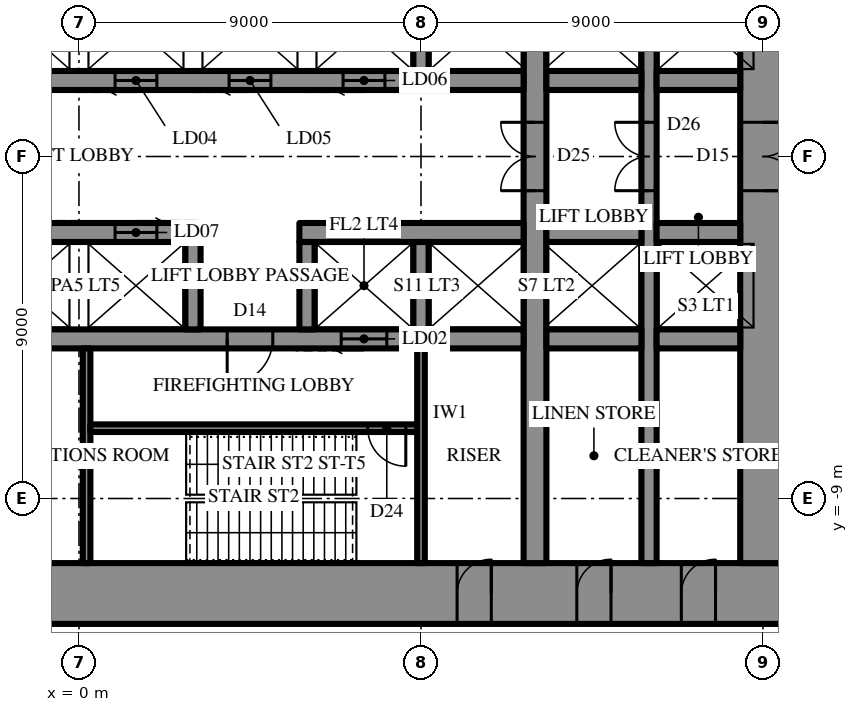
"""IFC4 building model, lengths in metres.
Left out: names, types, materials, properties, quantities, classifications, styles, units other than length and angle.
Written with IfcOpenShell. Run it as: python <this file> out.ifc"""

import sys

from ifc_helpers import new_model, si_unit, direction, frame, frame_2d, origin, place, context, subcontext, project, spatial, rectangle, extrude, element, fill, save


model = new_model("IFC4")
c1 = context("Model", 3, precision=1e-05, world=origin(), true_north=direction((0.0, 1.0)))
c2 = subcontext(c1, "Body", "Model", "MODEL_VIEW")
j1 = project(units=[si_unit("LENGTHUNIT", "METRE"), si_unit("PLANEANGLEUNIT", "RADIAN")], contexts=[c1])
p1 = place(None, origin())
s1 = spatial("IfcSite", under=j1, at=p1, CompositionType="ELEMENT")
p2 = place(p1, origin())
s2 = spatial("IfcBuilding", under=s1, at=p2, CompositionType="ELEMENT")
p3 = place(p2, frame((0.0, 0.0, 7.0)))
s3 = spatial("IfcBuildingStorey", under=s2, at=p3, CompositionType="ELEMENT", Elevation=7.0)
p4 = place(p3, frame((18.6, -11.5, 0.0), z_axis=(0.0, 0.0, 1.0), x_axis=(-1.0, 0.0, 0.0)))
e1 = element("IfcWall", 1, at=p4, inside=s3, PredefinedType="SHEAR", context=c2, shape_type="SweptSolid", body=[
    extrude(rectangle(XDim=37.2, YDim=1.6, at=frame_2d((18.6, 0.0))), origin(), (0.0, 0.0, 1.0), 6.0),
])
p5 = place(p4, frame((19.45, 0.0, 0.0)))
e2 = element("IfcOpeningElement", 2, at=p5, cuts=e1, PredefinedType="OPENING", context=c2, shape_type="SweptSolid", body=[
    extrude(rectangle(XDim=0.9, YDim=2.2, at=frame_2d((0.45, 1.1))), frame((0.0, 0.81, 0.0), z_axis=(0.0, -1.0, 0.0), x_axis=(1.0, 0.0, 0.0)), (0.0, 0.0, 1.0), 1.62),
])
p6 = place(p4, frame((22.45, 0.0, 0.0)))
e3 = element("IfcOpeningElement", 3, at=p6, cuts=e1, PredefinedType="OPENING", context=c2, shape_type="SweptSolid", body=[
    extrude(rectangle(XDim=0.9, YDim=2.2, at=frame_2d((0.45, 1.1))), frame((0.0, 0.81, 0.0), z_axis=(0.0, -1.0, 0.0), x_axis=(1.0, 0.0, 0.0)), (0.0, 0.0, 1.0), 1.62),
])
p7 = place(p4, frame((25.5, 0.0, 0.0)))
e4 = element("IfcOpeningElement", 4, at=p7, cuts=e1, PredefinedType="OPENING", context=c2, shape_type="SweptSolid", body=[
    extrude(rectangle(XDim=1.0, YDim=2.2, at=frame_2d((0.5, 1.1))), frame((0.0, 0.81, 0.0), z_axis=(0.0, -1.0, 0.0), x_axis=(1.0, 0.0, 0.0)), (0.0, 0.0, 1.0), 1.62),
])
p8 = place(p4, frame((1.85, 0.0, 0.0)))
e5 = element("IfcOpeningElement", 5, at=p8, cuts=e1, PredefinedType="OPENING", context=c2, shape_type="SweptSolid", body=[
    extrude(rectangle(XDim=0.9, YDim=2.2, at=frame_2d((0.45, 1.1))), frame((0.0, 0.81, 0.0), z_axis=(0.0, -1.0, 0.0), x_axis=(1.0, 0.0, 0.0)), (0.0, 0.0, 1.0), 1.62),
])
p9 = place(p4, frame((4.6, 0.0, 0.0)))
e6 = element("IfcOpeningElement", 6, at=p9, cuts=e1, PredefinedType="OPENING", context=c2, shape_type="SweptSolid", body=[
    extrude(rectangle(XDim=0.9, YDim=2.2, at=frame_2d((0.45, 1.1))), frame((0.0, 0.81, 0.0), z_axis=(0.0, -1.0, 0.0), x_axis=(1.0, 0.0, 0.0)), (0.0, 0.0, 1.0), 1.62),
])
p10 = place(p4, frame((7.75, 0.0, 0.0)))
e7 = element("IfcOpeningElement", 7, at=p10, cuts=e1, PredefinedType="OPENING", context=c2, shape_type="SweptSolid", body=[
    extrude(rectangle(XDim=0.9, YDim=2.2, at=frame_2d((0.45, 1.1))), frame((0.0, 0.81, 0.0), z_axis=(0.0, -1.0, 0.0), x_axis=(1.0, 0.0, 0.0)), (0.0, 0.0, 1.0), 1.62),
])
p11 = place(p4, frame((28.55, 0.0, 0.0)))
e8 = element("IfcOpeningElement", 8, at=p11, cuts=e1, PredefinedType="OPENING", context=c2, shape_type="SweptSolid", body=[
    extrude(rectangle(XDim=0.9, YDim=2.2, at=frame_2d((0.45, 1.1))), frame((0.0, 0.81, 0.0), z_axis=(0.0, -1.0, 0.0), x_axis=(1.0, 0.0, 0.0)), (0.0, 0.0, 1.0), 1.62),
])
p12 = place(p4, frame((31.7, 0.0, 0.0)))
e9 = element("IfcOpeningElement", 9, at=p12, cuts=e1, PredefinedType="OPENING", context=c2, shape_type="SweptSolid", body=[
    extrude(rectangle(XDim=0.9, YDim=2.2, at=frame_2d((0.45, 1.1))), frame((0.0, 0.81, 0.0), z_axis=(0.0, -1.0, 0.0), x_axis=(1.0, 0.0, 0.0)), (0.0, 0.0, 1.0), 1.62),
])
p13 = place(p4, frame((34.45, 0.0, 0.0)))
e10 = element("IfcOpeningElement", 10, at=p13, cuts=e1, PredefinedType="OPENING", context=c2, shape_type="SweptSolid", body=[
    extrude(rectangle(XDim=0.9, YDim=2.2, at=frame_2d((0.45, 1.1))), frame((0.0, 0.81, 0.0), z_axis=(0.0, -1.0, 0.0), x_axis=(1.0, 0.0, 0.0)), (0.0, 0.0, 1.0), 1.62),
])
p14 = place(p3, frame((18.0, -10.7, 0.0), z_axis=(0.0, 0.0, 1.0), x_axis=(0.0, 1.0, 0.0)))
e11 = element("IfcWall", 11, at=p14, inside=s3, PredefinedType="SHEAR", context=c2, shape_type="SweptSolid", body=[
    extrude(rectangle(XDim=21.4, YDim=1.2, at=frame_2d((10.7, 0.0))), origin(), (0.0, 0.0, 1.0), 6.0),
])
p15 = place(p14, frame((9.8, 0.0, 0.0)))
e12 = element("IfcOpeningElement", 12, at=p15, cuts=e11, PredefinedType="OPENING", context=c2, shape_type="SweptSolid", body=[
    extrude(rectangle(XDim=1.8, YDim=2.4, at=frame_2d((0.9, 1.2))), frame((0.0, 0.61, 0.0), z_axis=(0.0, -1.0, 0.0), x_axis=(1.0, 0.0, 0.0)), (0.0, 0.0, 1.0), 1.22),
])
p16 = place(p3, frame((12.0, -10.7, 0.0), z_axis=(0.0, 0.0, 1.0), x_axis=(0.0, 1.0, 0.0)))
e13 = element("IfcWall", 13, at=p16, inside=s3, PredefinedType="SHEAR", context=c2, shape_type="SweptSolid", body=[
    extrude(rectangle(XDim=21.4, YDim=0.6, at=frame_2d((10.7, 0.0))), origin(), (0.0, 0.0, 1.0), 6.0),
])
p17 = place(p16, frame((9.8, 0.0, 0.0)))
e14 = element("IfcOpeningElement", 14, at=p17, cuts=e13, PredefinedType="OPENING", context=c2, shape_type="SweptSolid", body=[
    extrude(rectangle(XDim=1.8, YDim=2.4, at=frame_2d((0.9, 1.2))), frame((0.0, 0.31, 0.0), z_axis=(0.0, -1.0, 0.0), x_axis=(1.0, 0.0, 0.0)), (0.0, 0.0, 1.0), 0.62),
])
p18 = place(p3, frame((15.0, -10.7, 0.0), z_axis=(0.0, 0.0, 1.0), x_axis=(0.0, 1.0, 0.0)))
e15 = element("IfcWall", 15, at=p18, inside=s3, PredefinedType="SHEAR", context=c2, shape_type="SweptSolid", body=[
    extrude(rectangle(XDim=21.4, YDim=0.4, at=frame_2d((10.7, 0.0))), origin(), (0.0, 0.0, 1.0), 6.0),
])
p19 = place(p18, frame((9.8, 0.0, 0.0)))
e16 = element("IfcOpeningElement", 16, at=p19, cuts=e15, PredefinedType="OPENING", context=c2, shape_type="SweptSolid", body=[
    extrude(rectangle(XDim=1.8, YDim=2.4, at=frame_2d((0.9, 1.2))), frame((0.0, 0.21, 0.0), z_axis=(0.0, -1.0, 0.0), x_axis=(1.0, 0.0, 0.0)), (0.0, 0.0, 1.0), 0.42),
])
p20 = place(p3, frame((-3.2, 2.0, 0.0), z_axis=(0.0, 0.0, 1.0), x_axis=(1.0, 0.0, 0.0)))
e17 = element("IfcWall", 17, at=p20, inside=s3, PredefinedType="SHEAR", context=c2, shape_type="SweptSolid", body=[
    extrude(rectangle(XDim=14.9, YDim=0.5, at=frame_2d((7.45, 0.0))), origin(), (0.0, 0.0, 1.0), 6.0),
])
p21 = place(p20, frame((1.15, 0.0, 0.0)))
e18 = element("IfcOpeningElement", 18, at=p21, cuts=e17, PredefinedType="OPENING", context=c2, shape_type="SweptSolid", body=[
    extrude(rectangle(XDim=1.1, YDim=2.2, at=frame_2d((0.55, 1.1))), frame((0.0, 0.26, 0.0), z_axis=(0.0, -1.0, 0.0), x_axis=(1.0, 0.0, 0.0)), (0.0, 0.0, 1.0), 0.52),
])
p22 = place(p20, frame((4.15, 0.0, 0.0)))
e19 = element("IfcOpeningElement", 19, at=p22, cuts=e17, PredefinedType="OPENING", context=c2, shape_type="SweptSolid", body=[
    extrude(rectangle(XDim=1.1, YDim=2.2, at=frame_2d((0.55, 1.1))), frame((0.0, 0.26, 0.0), z_axis=(0.0, -1.0, 0.0), x_axis=(1.0, 0.0, 0.0)), (0.0, 0.0, 1.0), 0.52),
])
p23 = place(p20, frame((7.15, 0.0, 0.0)))
e20 = element("IfcOpeningElement", 20, at=p23, cuts=e17, PredefinedType="OPENING", context=c2, shape_type="SweptSolid", body=[
    extrude(rectangle(XDim=1.1, YDim=2.2, at=frame_2d((0.55, 1.1))), frame((0.0, 0.26, 0.0), z_axis=(0.0, -1.0, 0.0), x_axis=(1.0, 0.0, 0.0)), (0.0, 0.0, 1.0), 0.52),
])
p24 = place(p20, frame((10.15, 0.0, 0.0)))
e21 = element("IfcOpeningElement", 21, at=p24, cuts=e17, PredefinedType="OPENING", context=c2, shape_type="SweptSolid", body=[
    extrude(rectangle(XDim=1.1, YDim=2.2, at=frame_2d((0.55, 1.1))), frame((0.0, 0.26, 0.0), z_axis=(0.0, -1.0, 0.0), x_axis=(1.0, 0.0, 0.0)), (0.0, 0.0, 1.0), 0.52),
])
p25 = place(p3, frame((12.3, 2.0, 0.0), z_axis=(0.0, 0.0, 1.0), x_axis=(1.0, 0.0, 0.0)))
e22 = element("IfcWall", 22, at=p25, inside=s3, PredefinedType="SHEAR", context=c2, shape_type="SweptSolid", body=[
    extrude(rectangle(XDim=2.5, YDim=0.5, at=frame_2d((1.25, 0.0))), origin(), (0.0, 0.0, 1.0), 6.0),
])
p26 = place(p3, frame((15.2, 2.0, 0.0), z_axis=(0.0, 0.0, 1.0), x_axis=(1.0, 0.0, 0.0)))
e23 = element("IfcWall", 23, at=p26, inside=s3, PredefinedType="SHEAR", context=c2, shape_type="SweptSolid", body=[
    extrude(rectangle(XDim=2.2, YDim=0.5, at=frame_2d((1.1, 0.0))), origin(), (0.0, 0.0, 1.0), 6.0),
])
p27 = place(p3, frame((9.0, 2.25, 0.0), z_axis=(0.0, 0.0, 1.0), x_axis=(0.0, 1.0, 0.0)))
e24 = element("IfcWall", 24, at=p27, inside=s3, PredefinedType="SHEAR", context=c2, shape_type="SweptSolid", body=[
    extrude(rectangle(XDim=2.3, YDim=0.4, at=frame_2d((1.15, 0.0))), origin(), (0.0, 0.0, 1.0), 6.0),
])
p28 = place(p3, frame((17.4, -2.0, 0.0), z_axis=(0.0, 0.0, 1.0), x_axis=(-1.0, 0.0, 0.0)))
e25 = element("IfcWall", 25, at=p28, inside=s3, PredefinedType="SHEAR", context=c2, shape_type="SweptSolid", body=[
    extrude(rectangle(XDim=2.2, YDim=0.5, at=frame_2d((1.1, 0.0))), origin(), (0.0, 0.0, 1.0), 6.0),
])
p29 = place(p3, frame((14.8, -2.0, 0.0), z_axis=(0.0, 0.0, 1.0), x_axis=(-1.0, 0.0, 0.0)))
e26 = element("IfcWall", 26, at=p29, inside=s3, PredefinedType="SHEAR", context=c2, shape_type="SweptSolid", body=[
    extrude(rectangle(XDim=2.5, YDim=0.5, at=frame_2d((1.25, 0.0))), origin(), (0.0, 0.0, 1.0), 6.0),
])
p30 = place(p3, frame((11.7, -2.0, 0.0), z_axis=(0.0, 0.0, 1.0), x_axis=(-1.0, 0.0, 0.0)))
e27 = element("IfcWall", 27, at=p30, inside=s3, PredefinedType="SHEAR", context=c2, shape_type="SweptSolid", body=[
    extrude(rectangle(XDim=5.9, YDim=0.5, at=frame_2d((2.95, 0.0))), origin(), (0.0, 0.0, 1.0), 6.0),
])
p31 = place(p3, frame((3.2, -2.0, 0.0), z_axis=(0.0, 0.0, 1.0), x_axis=(-1.0, 0.0, 0.0)))
e28 = element("IfcWall", 28, at=p31, inside=s3, PredefinedType="SHEAR", context=c2, shape_type="SweptSolid", body=[
    extrude(rectangle(XDim=14.9, YDim=0.5, at=frame_2d((7.45, 0.0))), origin(), (0.0, 0.0, 1.0), 6.0),
])
p32 = place(p31, frame((1.15, 0.0, 0.0)))
e29 = element("IfcOpeningElement", 29, at=p32, cuts=e28, PredefinedType="OPENING", context=c2, shape_type="SweptSolid", body=[
    extrude(rectangle(XDim=1.1, YDim=2.2, at=frame_2d((0.55, 1.1))), frame((0.0, 0.26, 0.0), z_axis=(0.0, -1.0, 0.0), x_axis=(1.0, 0.0, 0.0)), (0.0, 0.0, 1.0), 0.52),
])
p33 = place(p31, frame((4.15, 0.0, 0.0)))
e30 = element("IfcOpeningElement", 30, at=p33, cuts=e28, PredefinedType="OPENING", context=c2, shape_type="SweptSolid", body=[
    extrude(rectangle(XDim=1.1, YDim=2.2, at=frame_2d((0.55, 1.1))), frame((0.0, 0.26, 0.0), z_axis=(0.0, -1.0, 0.0), x_axis=(1.0, 0.0, 0.0)), (0.0, 0.0, 1.0), 0.52),
])
p34 = place(p31, frame((7.15, 0.0, 0.0)))
e31 = element("IfcOpeningElement", 31, at=p34, cuts=e28, PredefinedType="OPENING", context=c2, shape_type="SweptSolid", body=[
    extrude(rectangle(XDim=1.1, YDim=2.2, at=frame_2d((0.55, 1.1))), frame((0.0, 0.26, 0.0), z_axis=(0.0, -1.0, 0.0), x_axis=(1.0, 0.0, 0.0)), (0.0, 0.0, 1.0), 0.52),
])
p35 = place(p31, frame((10.15, 0.0, 0.0)))
e32 = element("IfcOpeningElement", 32, at=p35, cuts=e28, PredefinedType="OPENING", context=c2, shape_type="SweptSolid", body=[
    extrude(rectangle(XDim=1.1, YDim=2.2, at=frame_2d((0.55, 1.1))), frame((0.0, 0.26, 0.0), z_axis=(0.0, -1.0, 0.0), x_axis=(1.0, 0.0, 0.0)), (0.0, 0.0, 1.0), 0.52),
])
p36 = place(p3, frame((17.4, -4.8, 0.0), z_axis=(0.0, 0.0, 1.0), x_axis=(-1.0, 0.0, 0.0)))
e33 = element("IfcWall", 33, at=p36, inside=s3, PredefinedType="SHEAR", context=c2, shape_type="SweptSolid", body=[
    extrude(rectangle(XDim=2.2, YDim=0.5, at=frame_2d((1.1, 0.0))), origin(), (0.0, 0.0, 1.0), 6.0),
])
p37 = place(p3, frame((14.8, -4.8, 0.0), z_axis=(0.0, 0.0, 1.0), x_axis=(-1.0, 0.0, 0.0)))
e34 = element("IfcWall", 34, at=p37, inside=s3, PredefinedType="SHEAR", context=c2, shape_type="SweptSolid", body=[
    extrude(rectangle(XDim=2.5, YDim=0.5, at=frame_2d((1.25, 0.0))), origin(), (0.0, 0.0, 1.0), 6.0),
])
p38 = place(p3, frame((11.7, -4.8, 0.0), z_axis=(0.0, 0.0, 1.0), x_axis=(-1.0, 0.0, 0.0)))
e35 = element("IfcWall", 35, at=p38, inside=s3, PredefinedType="SHEAR", context=c2, shape_type="SweptSolid", body=[
    extrude(rectangle(XDim=23.4, YDim=0.5, at=frame_2d((11.7, 0.0))), origin(), (0.0, 0.0, 1.0), 6.0),
])
p39 = place(p38, frame((6.6, 0.0, 0.0)))
e36 = element("IfcOpeningElement", 36, at=p39, cuts=e35, PredefinedType="OPENING", context=c2, shape_type="SweptSolid", body=[
    extrude(rectangle(XDim=1.2, YDim=2.2, at=frame_2d((0.6, 1.1))), frame((0.0, 0.26, 0.0), z_axis=(0.0, -1.0, 0.0), x_axis=(1.0, 0.0, 0.0)), (0.0, 0.0, 1.0), 0.52),
])
p40 = place(p38, frame((3.6, 0.0, 0.0)))
e37 = element("IfcOpeningElement", 37, at=p40, cuts=e35, PredefinedType="OPENING", context=c2, shape_type="SweptSolid", body=[
    extrude(rectangle(XDim=1.2, YDim=2.2, at=frame_2d((0.6, 1.1))), frame((0.0, 0.26, 0.0), z_axis=(0.0, -1.0, 0.0), x_axis=(1.0, 0.0, 0.0)), (0.0, 0.0, 1.0), 0.52),
])
for number, where, z_axis, x_axis in (
    (38, (9.0, -2.25, 0.0), (0.0, 0.0, 1.0), (0.0, -1.0, 0.0)),
    (39, (6.0, -2.25, 0.0), (0.0, 0.0, 1.0), (0.0, -1.0, 0.0)),
    (40, (3.0, -2.25, 0.0), (0.0, 0.0, 1.0), (0.0, -1.0, 0.0)),
):
    element("IfcWall", number, at=place(p3, frame(where, z_axis=z_axis, x_axis=x_axis)), inside=s3, PredefinedType="SHEAR", context=c2, shape_type="SweptSolid", body=[
        extrude(rectangle(XDim=2.3, YDim=0.4, at=frame_2d((1.15, 0.0))), origin(), (0.0, 0.0, 1.0), 6.0),
    ])
p41 = place(p3, frame((0.2, -5.05, 0.0), z_axis=(0.0, 0.0, 1.0), x_axis=(0.0, -1.0, 0.0)))
e41 = element("IfcWall", 41, at=p41, inside=s3, PredefinedType="SHEAR", context=c2, shape_type="SweptSolid", body=[
    extrude(rectangle(XDim=5.65, YDim=0.2, at=frame_2d((2.825, 0.0))), origin(), (0.0, 0.0, 1.0), 6.0),
])
p42 = place(p3, frame((8.9, -7.15, 0.0), z_axis=(0.0, 0.0, 1.0), x_axis=(-1.0, 0.0, 0.0)))
e42 = element("IfcWall", 42, at=p42, inside=s3, PredefinedType="SHEAR", context=c2, shape_type="SweptSolid", body=[
    extrude(rectangle(XDim=8.6, YDim=0.2, at=frame_2d((4.3, 0.0))), origin(), (0.0, 0.0, 1.0), 6.0),
])
p43 = place(p42, frame((0.3, 0.0, 0.0)))
e43 = element("IfcOpeningElement", 43, at=p43, cuts=e42, PredefinedType="OPENING", context=c2, shape_type="SweptSolid", body=[
    extrude(rectangle(XDim=1.0, YDim=2.2, at=frame_2d((0.5, 1.1))), frame((0.0, 0.11, 0.0), z_axis=(0.0, -1.0, 0.0), x_axis=(1.0, 0.0, 0.0)), (0.0, 0.0, 1.0), 0.22),
])
p44 = place(p3, frame((9.0, -5.05, 0.0), z_axis=(0.0, 0.0, 1.0), x_axis=(0.0, -1.0, 0.0)))
e44 = element("IfcWall", 44, at=p44, inside=s3, PredefinedType="PARTITIONING", context=c2, shape_type="SweptSolid", body=[
    extrude(rectangle(XDim=5.65, YDim=0.2, at=frame_2d((2.825, 0.0))), origin(), (0.0, 0.0, 1.0), 5.65),
])
p45 = place(p15, frame((1.8, 0.0, 0.0), z_axis=(0.0, 0.0, 1.0), x_axis=(-1.0, 0.0, 0.0)))
e45 = element("IfcDoor", 45, at=p45, inside=s3, OperationType="DOUBLE_DOOR_SINGLE_SWING", PredefinedType="DOOR", context=c2, shape_type="SweptSolid", body=[
    extrude(rectangle(XDim=1.8, YDim=2.4, at=frame_2d((0.9, 1.2))), frame((0.0, 0.025, 0.0), z_axis=(0.0, -1.0, 0.0), x_axis=(1.0, 0.0, 0.0)), (0.0, 0.0, 1.0), 0.05),
])
fill(e12, e45)
p46 = place(p39, origin())
e46 = element("IfcDoor", 46, at=p46, inside=s3, OperationType="SINGLE_SWING_LEFT", PredefinedType="DOOR", context=c2, shape_type="SweptSolid", body=[
    extrude(rectangle(XDim=1.2, YDim=2.2, at=frame_2d((0.6, 1.1))), frame((0.0, 0.025, 0.0), z_axis=(0.0, -1.0, 0.0), x_axis=(1.0, 0.0, 0.0)), (0.0, 0.0, 1.0), 0.05),
])
fill(e36, e46)
p47 = place(p43, origin())
e47 = element("IfcDoor", 47, at=p47, inside=s3, OperationType="SINGLE_SWING_RIGHT", PredefinedType="DOOR", context=c2, shape_type="SweptSolid", body=[
    extrude(rectangle(XDim=1.0, YDim=2.2, at=frame_2d((0.5, 1.1))), frame((0.0, 0.025, 0.0), z_axis=(0.0, -1.0, 0.0), x_axis=(1.0, 0.0, 0.0)), (0.0, 0.0, 1.0), 0.05),
])
fill(e43, e47)
p48 = place(p8, frame((0.9, 0.0, 0.0), z_axis=(0.0, 0.0, 1.0), x_axis=(-1.0, 0.0, 0.0)))
e48 = element("IfcDoor", 48, at=p48, inside=s3, OperationType="SINGLE_SWING_LEFT", PredefinedType="DOOR", context=c2, shape_type="SweptSolid", body=[
    extrude(rectangle(XDim=0.9, YDim=2.2, at=frame_2d((0.45, 1.1))), frame((0.0, 0.025, 0.0), z_axis=(0.0, -1.0, 0.0), x_axis=(1.0, 0.0, 0.0)), (0.0, 0.0, 1.0), 0.05),
])
fill(e5, e48)
p49 = place(p9, frame((0.9, 0.0, 0.0), z_axis=(0.0, 0.0, 1.0), x_axis=(-1.0, 0.0, 0.0)))
e49 = element("IfcDoor", 49, at=p49, inside=s3, OperationType="SINGLE_SWING_LEFT", PredefinedType="DOOR", context=c2, shape_type="SweptSolid", body=[
    extrude(rectangle(XDim=0.9, YDim=2.2, at=frame_2d((0.45, 1.1))), frame((0.0, 0.025, 0.0), z_axis=(0.0, -1.0, 0.0), x_axis=(1.0, 0.0, 0.0)), (0.0, 0.0, 1.0), 0.05),
])
fill(e6, e49)
p50 = place(p10, frame((0.9, 0.0, 0.0), z_axis=(0.0, 0.0, 1.0), x_axis=(-1.0, 0.0, 0.0)))
e50 = element("IfcDoor", 50, at=p50, inside=s3, OperationType="SINGLE_SWING_LEFT", PredefinedType="DOOR", context=c2, shape_type="SweptSolid", body=[
    extrude(rectangle(XDim=0.9, YDim=2.2, at=frame_2d((0.45, 1.1))), frame((0.0, 0.025, 0.0), z_axis=(0.0, -1.0, 0.0), x_axis=(1.0, 0.0, 0.0)), (0.0, 0.0, 1.0), 0.05),
])
fill(e7, e50)
p51 = place(p17, origin())
e51 = element("IfcDoor", 51, at=p51, inside=s3, OperationType="DOUBLE_DOOR_SINGLE_SWING", PredefinedType="DOOR", context=c2, shape_type="SweptSolid", body=[
    extrude(rectangle(XDim=1.8, YDim=2.4, at=frame_2d((0.9, 1.2))), frame((0.0, 0.025, 0.0), z_axis=(0.0, -1.0, 0.0), x_axis=(1.0, 0.0, 0.0)), (0.0, 0.0, 1.0), 0.05),
])
fill(e14, e51)
p52 = place(p19, origin())
e52 = element("IfcDoor", 52, at=p52, inside=s3, OperationType="DOUBLE_DOOR_SINGLE_SWING", PredefinedType="DOOR", context=c2, shape_type="SweptSolid", body=[
    extrude(rectangle(XDim=1.8, YDim=2.4, at=frame_2d((0.9, 1.2))), frame((0.0, 0.025, 0.0), z_axis=(0.0, -1.0, 0.0), x_axis=(1.0, 0.0, 0.0)), (0.0, 0.0, 1.0), 0.05),
])
fill(e16, e52)
p53 = place(p22, frame((1.1, 0.0, 0.0), z_axis=(0.0, 0.0, 1.0), x_axis=(-1.0, 0.0, 0.0)))
e53 = element("IfcDoor", 53, at=p53, inside=s3, OperationType="SLIDING_TO_LEFT", PredefinedType="DOOR", context=c2, shape_type="SweptSolid", body=[
    extrude(rectangle(XDim=1.1, YDim=2.2, at=frame_2d((0.55, 1.1))), frame((0.0, 0.025, 0.0), z_axis=(0.0, -1.0, 0.0), x_axis=(1.0, 0.0, 0.0)), (0.0, 0.0, 1.0), 0.05),
])
fill(e19, e53)
p54 = place(p23, frame((1.1, 0.0, 0.0), z_axis=(0.0, 0.0, 1.0), x_axis=(-1.0, 0.0, 0.0)))
e54 = element("IfcDoor", 54, at=p54, inside=s3, OperationType="SLIDING_TO_LEFT", PredefinedType="DOOR", context=c2, shape_type="SweptSolid", body=[
    extrude(rectangle(XDim=1.1, YDim=2.2, at=frame_2d((0.55, 1.1))), frame((0.0, 0.025, 0.0), z_axis=(0.0, -1.0, 0.0), x_axis=(1.0, 0.0, 0.0)), (0.0, 0.0, 1.0), 0.05),
])
fill(e20, e54)
p55 = place(p24, frame((1.1, 0.0, 0.0), z_axis=(0.0, 0.0, 1.0), x_axis=(-1.0, 0.0, 0.0)))
e55 = element("IfcDoor", 55, at=p55, inside=s3, OperationType="SLIDING_TO_LEFT", PredefinedType="DOOR", context=c2, shape_type="SweptSolid", body=[
    extrude(rectangle(XDim=1.1, YDim=2.2, at=frame_2d((0.55, 1.1))), frame((0.0, 0.025, 0.0), z_axis=(0.0, -1.0, 0.0), x_axis=(1.0, 0.0, 0.0)), (0.0, 0.0, 1.0), 0.05),
])
fill(e21, e55)
p56 = place(p40, origin())
e56 = element("IfcDoor", 56, at=p56, inside=s3, OperationType="SLIDING_TO_LEFT", PredefinedType="DOOR", context=c2, shape_type="SweptSolid", body=[
    extrude(rectangle(XDim=1.2, YDim=2.2, at=frame_2d((0.6, 1.1))), frame((0.0, 0.025, 0.0), z_axis=(0.0, -1.0, 0.0), x_axis=(1.0, 0.0, 0.0)), (0.0, 0.0, 1.0), 0.05),
])
fill(e37, e56)
p57 = place(p32, frame((1.1, 0.0, 0.0), z_axis=(0.0, 0.0, 1.0), x_axis=(-1.0, 0.0, 0.0)))
e57 = element("IfcDoor", 57, at=p57, inside=s3, OperationType="SLIDING_TO_LEFT", PredefinedType="DOOR", context=c2, shape_type="SweptSolid", body=[
    extrude(rectangle(XDim=1.1, YDim=2.2, at=frame_2d((0.55, 1.1))), frame((0.0, 0.025, 0.0), z_axis=(0.0, -1.0, 0.0), x_axis=(1.0, 0.0, 0.0)), (0.0, 0.0, 1.0), 0.05),
])
fill(e29, e57)
save(model, sys.argv[1])
